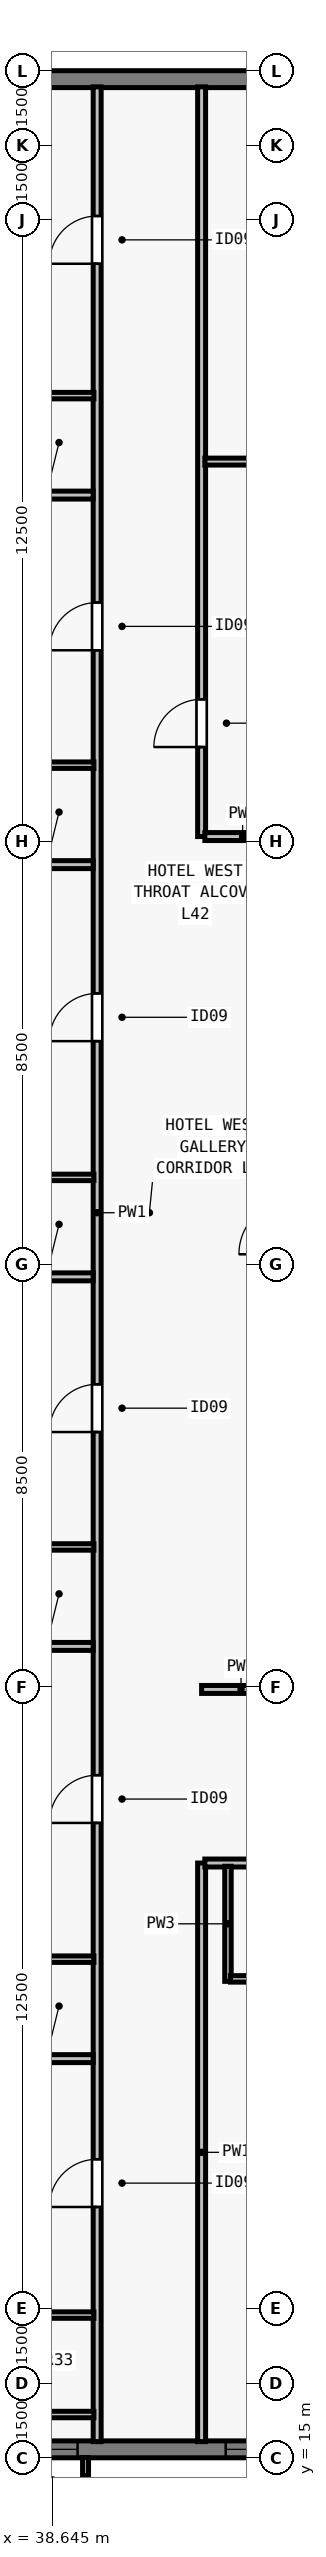
"""IFC4 building model, lengths in metres.
Left out: names, types, materials, properties, quantities, classifications, styles, units other than length and angle.
Written with IfcOpenShell. Run it as: python <this file> out.ifc"""

import sys

from ifc_helpers import new_model, si_unit, direction, frame, frame_2d, origin, place, context, subcontext, project, spatial, rectangle, extrude, element, fill, save


model = new_model("IFC4")
c1 = context("Model", 3, precision=1e-05, world=origin(), true_north=direction((0.0, 1.0)))
c2 = subcontext(c1, "Body", "Model", "MODEL_VIEW")
j1 = project(units=[si_unit("LENGTHUNIT", "METRE"), si_unit("PLANEANGLEUNIT", "RADIAN")], contexts=[c1])
p1 = place(None, origin())
s1 = spatial("IfcSite", under=j1, at=p1, CompositionType="ELEMENT")
p2 = place(p1, origin())
s2 = spatial("IfcBuilding", under=s1, at=p2, CompositionType="ELEMENT")
p3 = place(p2, frame((0.0, 0.0, 155.0)))
s3 = spatial("IfcBuildingStorey", under=s2, at=p3, CompositionType="ELEMENT", Elevation=155.0)
p4 = place(p3, frame((48.6, 15.17, 0.0), z_axis=(0.0, 0.0, 1.0), x_axis=(-1.0, 0.0, 0.0)))
e1 = element("IfcWall", 1, at=p4, inside=s3, PredefinedType="SOLIDWALL", context=c2, shape_type="SweptSolid", body=[
    extrude(rectangle(XDim=16.282, YDim=0.34, at=frame_2d((8.141, 0.0))), origin(), (0.0, 0.0, 1.0), 3.28),
])
p5 = place(p4, frame((2.439, 0.0, 0.8)))
e2 = element("IfcOpeningElement", 2, at=p5, cuts=e1, PredefinedType="OPENING", context=c2, shape_type="SweptSolid", body=[
    extrude(rectangle(XDim=1.35, YDim=1.66, at=frame_2d((0.675, 0.83))), frame((0.0, 0.18, 0.0), z_axis=(0.0, -1.0, 0.0), x_axis=(1.0, 0.0, 0.0)), (0.0, 0.0, 1.0), 0.36),
])
p6 = place(p4, frame((4.716, 0.0, 0.8)))
e3 = element("IfcOpeningElement", 3, at=p6, cuts=e1, PredefinedType="OPENING", context=c2, shape_type="SweptSolid", body=[
    extrude(rectangle(XDim=1.75, YDim=1.66, at=frame_2d((0.875, 0.83))), frame((0.0, 0.18, 0.0), z_axis=(0.0, -1.0, 0.0), x_axis=(1.0, 0.0, 0.0)), (0.0, 0.0, 1.0), 0.36),
])
p7 = place(p4, frame((9.443, 0.0, 0.8)))
e4 = element("IfcOpeningElement", 4, at=p7, cuts=e1, PredefinedType="OPENING", context=c2, shape_type="SweptSolid", body=[
    extrude(rectangle(XDim=1.35, YDim=1.66, at=frame_2d((0.675, 0.83))), frame((0.0, 0.18, 0.0), z_axis=(0.0, -1.0, 0.0), x_axis=(1.0, 0.0, 0.0)), (0.0, 0.0, 1.0), 0.36),
])
p8 = place(p3, frame((32.0, 62.83, 0.0), z_axis=(0.0, 0.0, 1.0), x_axis=(1.0, 0.0, 0.0)))
e5 = element("IfcWall", 5, at=p8, inside=s3, PredefinedType="SOLIDWALL", context=c2, shape_type="SweptSolid", body=[
    extrude(rectangle(XDim=39.682, YDim=0.34, at=frame_2d((19.841, 0.0))), origin(), (0.0, 0.0, 1.0), 3.28),
])
p9 = place(p8, frame((4.952, 0.0, 0.8)))
e6 = element("IfcOpeningElement", 6, at=p9, cuts=e5, PredefinedType="OPENING", context=c2, shape_type="SweptSolid", body=[
    extrude(rectangle(XDim=1.35, YDim=1.66, at=frame_2d((0.675, 0.83))), frame((0.0, 0.18, 0.0), z_axis=(0.0, -1.0, 0.0), x_axis=(1.0, 0.0, 0.0)), (0.0, 0.0, 1.0), 0.36),
])
p10 = place(p8, frame((12.059, 0.0, 0.8)))
e7 = element("IfcOpeningElement", 7, at=p10, cuts=e5, PredefinedType="OPENING", context=c2, shape_type="SweptSolid", body=[
    extrude(rectangle(XDim=1.35, YDim=1.66, at=frame_2d((0.675, 0.83))), frame((0.0, 0.18, 0.0), z_axis=(0.0, -1.0, 0.0), x_axis=(1.0, 0.0, 0.0)), (0.0, 0.0, 1.0), 0.36),
])
p11 = place(p8, frame((16.262, 0.0, 0.8)))
e8 = element("IfcOpeningElement", 8, at=p11, cuts=e5, PredefinedType="OPENING", context=c2, shape_type="SweptSolid", body=[
    extrude(rectangle(XDim=1.75, YDim=1.66, at=frame_2d((0.875, 0.83))), frame((0.0, 0.18, 0.0), z_axis=(0.0, -1.0, 0.0), x_axis=(1.0, 0.0, 0.0)), (0.0, 0.0, 1.0), 0.36),
])
p12 = place(p8, frame((18.316, 0.0, 0.8)))
e9 = element("IfcOpeningElement", 9, at=p12, cuts=e5, PredefinedType="OPENING", context=c2, shape_type="SweptSolid", body=[
    extrude(rectangle(XDim=1.35, YDim=1.66, at=frame_2d((0.675, 0.83))), frame((0.0, 0.18, 0.0), z_axis=(0.0, -1.0, 0.0), x_axis=(1.0, 0.0, 0.0)), (0.0, 0.0, 1.0), 0.36),
])
p13 = place(p8, frame((22.07, 0.0, 0.8)))
e10 = element("IfcOpeningElement", 10, at=p13, cuts=e5, PredefinedType="OPENING", context=c2, shape_type="SweptSolid", body=[
    extrude(rectangle(XDim=1.75, YDim=1.66, at=frame_2d((0.875, 0.83))), frame((0.0, 0.18, 0.0), z_axis=(0.0, -1.0, 0.0), x_axis=(1.0, 0.0, 0.0)), (0.0, 0.0, 1.0), 0.36),
])
p14 = place(p8, frame((26.273, 0.0, 0.8)))
e11 = element("IfcOpeningElement", 11, at=p14, cuts=e5, PredefinedType="OPENING", context=c2, shape_type="SweptSolid", body=[
    extrude(rectangle(XDim=1.35, YDim=1.66, at=frame_2d((0.675, 0.83))), frame((0.0, 0.18, 0.0), z_axis=(0.0, -1.0, 0.0), x_axis=(1.0, 0.0, 0.0)), (0.0, 0.0, 1.0), 0.36),
])
p15 = place(p8, frame((29.627, 0.0, 0.8)))
e12 = element("IfcOpeningElement", 12, at=p15, cuts=e5, PredefinedType="OPENING", context=c2, shape_type="SweptSolid", body=[
    extrude(rectangle(XDim=1.75, YDim=1.66, at=frame_2d((0.875, 0.83))), frame((0.0, 0.18, 0.0), z_axis=(0.0, -1.0, 0.0), x_axis=(1.0, 0.0, 0.0)), (0.0, 0.0, 1.0), 0.36),
])
p16 = place(p3, frame((39.55, 15.325, 0.0), z_axis=(0.0, 0.0, 1.0), x_axis=(0.0, 1.0, 0.0)))
e13 = element("IfcWall", 13, at=p16, inside=s3, PredefinedType="PARTITIONING", context=c2, shape_type="SweptSolid", body=[
    extrude(rectangle(XDim=47.35, YDim=0.16, at=frame_2d((23.675, 0.0))), origin(), (0.0, 0.0, 1.0), 2.555),
])
p17 = place(p16, frame((4.718, 0.0, 0.0)))
e14 = element("IfcOpeningElement", 14, at=p17, cuts=e13, PredefinedType="OPENING", context=c2, shape_type="SweptSolid", body=[
    extrude(rectangle(XDim=0.96, YDim=2.15, at=frame_2d((0.48, 1.075))), frame((0.0, 0.09, 0.0), z_axis=(0.0, -1.0, 0.0), x_axis=(1.0, 0.0, 0.0)), (0.0, 0.0, 1.0), 0.18),
])
p18 = place(p16, frame((12.441, 0.0, 0.0)))
e15 = element("IfcOpeningElement", 15, at=p18, cuts=e13, PredefinedType="OPENING", context=c2, shape_type="SweptSolid", body=[
    extrude(rectangle(XDim=0.96, YDim=2.15, at=frame_2d((0.48, 1.075))), frame((0.0, 0.09, 0.0), z_axis=(0.0, -1.0, 0.0), x_axis=(1.0, 0.0, 0.0)), (0.0, 0.0, 1.0), 0.18),
])
p19 = place(p16, frame((20.301, 0.0, 0.0)))
e16 = element("IfcOpeningElement", 16, at=p19, cuts=e13, PredefinedType="OPENING", context=c2, shape_type="SweptSolid", body=[
    extrude(rectangle(XDim=0.96, YDim=2.15, at=frame_2d((0.48, 1.075))), frame((0.0, 0.09, 0.0), z_axis=(0.0, -1.0, 0.0), x_axis=(1.0, 0.0, 0.0)), (0.0, 0.0, 1.0), 0.18),
])
p20 = place(p16, frame((28.161, 0.0, 0.0)))
e17 = element("IfcOpeningElement", 17, at=p20, cuts=e13, PredefinedType="OPENING", context=c2, shape_type="SweptSolid", body=[
    extrude(rectangle(XDim=0.96, YDim=2.15, at=frame_2d((0.48, 1.075))), frame((0.0, 0.09, 0.0), z_axis=(0.0, -1.0, 0.0), x_axis=(1.0, 0.0, 0.0)), (0.0, 0.0, 1.0), 0.18),
])
p21 = place(p16, frame((36.021, 0.0, 0.0)))
e18 = element("IfcOpeningElement", 18, at=p21, cuts=e13, PredefinedType="OPENING", context=c2, shape_type="SweptSolid", body=[
    extrude(rectangle(XDim=0.96, YDim=2.15, at=frame_2d((0.48, 1.075))), frame((0.0, 0.09, 0.0), z_axis=(0.0, -1.0, 0.0), x_axis=(1.0, 0.0, 0.0)), (0.0, 0.0, 1.0), 0.18),
])
p22 = place(p16, frame((43.793, 0.0, 0.0)))
e19 = element("IfcOpeningElement", 19, at=p22, cuts=e13, PredefinedType="OPENING", context=c2, shape_type="SweptSolid", body=[
    extrude(rectangle(XDim=0.96, YDim=2.15, at=frame_2d((0.48, 1.075))), frame((0.0, 0.09, 0.0), z_axis=(0.0, -1.0, 0.0), x_axis=(1.0, 0.0, 0.0)), (0.0, 0.0, 1.0), 0.18),
])
p23 = place(p3, frame((41.65, 15.325, 0.0), z_axis=(0.0, 0.0, 1.0), x_axis=(0.0, 1.0, 0.0)))
e20 = element("IfcWall", 20, at=p23, inside=s3, PredefinedType="PARTITIONING", context=c2, shape_type="SweptSolid", body=[
    extrude(rectangle(XDim=11.635, YDim=0.16, at=frame_2d((5.817, 0.0))), origin(), (0.0, 0.0, 1.0), 3.28),
])
p24 = place(p3, frame((41.65, 47.6, 0.0), z_axis=(0.0, 0.0, 1.0), x_axis=(0.0, 1.0, 0.0)))
e21 = element("IfcWall", 21, at=p24, inside=s3, PredefinedType="PARTITIONING", context=c2, shape_type="SweptSolid", body=[
    extrude(rectangle(XDim=15.075, YDim=0.16, at=frame_2d((7.538, 0.0))), origin(), (0.0, 0.0, 1.0), 2.555),
])
p25 = place(p24, frame((1.8, 0.0, 0.0)))
e22 = element("IfcOpeningElement", 22, at=p25, cuts=e21, PredefinedType="OPENING", context=c2, shape_type="SweptSolid", body=[
    extrude(rectangle(XDim=0.96, YDim=2.12, at=frame_2d((0.48, 1.06))), frame((0.0, 0.09, 0.0), z_axis=(0.0, -1.0, 0.0), x_axis=(1.0, 0.0, 0.0)), (0.0, 0.0, 1.0), 0.18),
])
p26 = place(p3, frame((41.65, 30.45, 0.0), z_axis=(0.0, 0.0, 1.0), x_axis=(1.0, 0.0, 0.0)))
e23 = element("IfcWall", 23, at=p26, inside=s3, PredefinedType="PARTITIONING", context=c2, shape_type="SweptSolid", body=[
    extrude(rectangle(XDim=1.585, YDim=0.16, at=frame_2d((0.792, 0.0))), origin(), (0.0, 0.0, 1.0), 3.28),
])
p27 = place(p3, frame((41.715, 47.6, 0.0), z_axis=(0.0, 0.0, 1.0), x_axis=(1.0, 0.0, 0.0)))
e24 = element("IfcWall", 24, at=p27, inside=s3, PredefinedType="PARTITIONING", context=c2, shape_type="SweptSolid", body=[
    extrude(rectangle(XDim=1.52, YDim=0.16, at=frame_2d((0.76, 0.0))), origin(), (0.0, 0.0, 1.0), 3.28),
])
p28 = place(p3, frame((41.715, 26.96, 0.0), z_axis=(0.0, 0.0, 1.0), x_axis=(1.0, 0.0, 0.0)))
e25 = element("IfcWall", 25, at=p28, inside=s3, PredefinedType="PARTITIONING", context=c2, shape_type="SweptSolid", body=[
    extrude(rectangle(XDim=22.07, YDim=0.16, at=frame_2d((11.035, 0.0))), origin(), (0.0, 0.0, 1.0), 3.28),
])
p29 = place(p28, frame((6.15, 0.0, 0.0)))
e26 = element("IfcOpeningElement", 26, at=p29, cuts=e25, PredefinedType="OPENING", context=c2, shape_type="SweptSolid", body=[
    extrude(rectangle(XDim=0.96, YDim=2.15, at=frame_2d((0.48, 1.075))), frame((0.0, 0.09, 0.0), z_axis=(0.0, -1.0, 0.0), x_axis=(1.0, 0.0, 0.0)), (0.0, 0.0, 1.0), 0.18),
])
p30 = place(p28, frame((16.945, 0.0, 0.0)))
e27 = element("IfcOpeningElement", 27, at=p30, cuts=e25, PredefinedType="OPENING", context=c2, shape_type="SweptSolid", body=[
    extrude(rectangle(XDim=0.96, YDim=2.15, at=frame_2d((0.48, 1.075))), frame((0.0, 0.09, 0.0), z_axis=(0.0, -1.0, 0.0), x_axis=(1.0, 0.0, 0.0)), (0.0, 0.0, 1.0), 0.18),
])
p31 = place(p3, frame((41.715, 55.14, 0.0), z_axis=(0.0, 0.0, 1.0), x_axis=(1.0, 0.0, 0.0)))
e28 = element("IfcWall", 28, at=p31, inside=s3, PredefinedType="PARTITIONING", context=c2, shape_type="SweptSolid", body=[
    extrude(rectangle(XDim=22.07, YDim=0.14, at=frame_2d((11.035, 0.0))), origin(), (0.0, 0.0, 1.0), 3.28),
])
p32 = place(p31, frame((3.435, 0.0, 0.0)))
e29 = element("IfcOpeningElement", 29, at=p32, cuts=e28, PredefinedType="OPENING", context=c2, shape_type="SweptSolid", body=[
    extrude(rectangle(XDim=0.92, YDim=2.12, at=frame_2d((0.46, 1.06))), frame((0.0, 0.08, 0.0), z_axis=(0.0, -1.0, 0.0), x_axis=(1.0, 0.0, 0.0)), (0.0, 0.0, 1.0), 0.16),
])
p33 = place(p31, frame((14.435, 0.0, 0.0)))
e30 = element("IfcOpeningElement", 30, at=p33, cuts=e28, PredefinedType="OPENING", context=c2, shape_type="SweptSolid", body=[
    extrude(rectangle(XDim=0.92, YDim=2.12, at=frame_2d((0.46, 1.06))), frame((0.0, 0.08, 0.0), z_axis=(0.0, -1.0, 0.0), x_axis=(1.0, 0.0, 0.0)), (0.0, 0.0, 1.0), 0.16),
])
p34 = place(p3, frame((42.18, 24.58, 0.0), z_axis=(0.0, 0.0, 1.0), x_axis=(0.0, 1.0, 0.0)))
e31 = element("IfcWall", 31, at=p34, inside=s3, PredefinedType="PLUMBINGWALL", context=c2, shape_type="SweptSolid", body=[
    extrude(rectangle(XDim=2.315, YDim=0.13, at=frame_2d((1.157, 0.0))), origin(), (0.0, 0.0, 1.0), 3.28),
])
p35 = place(p3, frame((42.23, 24.63, 0.0), z_axis=(0.0, 0.0, 1.0), x_axis=(1.0, 0.0, 0.0)))
e32 = element("IfcWall", 32, at=p35, inside=s3, PredefinedType="PLUMBINGWALL", context=c2, shape_type="SweptSolid", body=[
    extrude(rectangle(XDim=1.9, YDim=0.13, at=frame_2d((0.95, 0.0))), origin(), (0.0, 0.0, 1.0), 3.28),
])
p36 = place(p35, frame((0.54, 0.0, 0.0)))
e33 = element("IfcOpeningElement", 33, at=p36, cuts=e32, PredefinedType="OPENING", context=c2, shape_type="SweptSolid", body=[
    extrude(rectangle(XDim=0.82, YDim=2.1, at=frame_2d((0.41, 1.05))), frame((0.0, 0.075, 0.0), z_axis=(0.0, -1.0, 0.0), x_axis=(1.0, 0.0, 0.0)), (0.0, 0.0, 1.0), 0.15),
])
for number, where, z_axis, x_axis in (
    (34, (37.17, 15.87, 0.0), (0.0, 0.0, 1.0), (1.0, 0.0, 0.0)),
    (35, (37.17, 17.87, 0.0), (0.0, 0.0, 1.0), (1.0, 0.0, 0.0)),
):
    element("IfcWall", number, at=place(p3, frame(where, z_axis=z_axis, x_axis=x_axis)), inside=s3, PredefinedType="PLUMBINGWALL", context=c2, shape_type="SweptSolid", body=[
        extrude(rectangle(XDim=2.315, YDim=0.13, at=frame_2d((1.158, 0.0))), origin(), (0.0, 0.0, 1.0), 3.28),
    ])
p37 = place(p3, frame((28.325, 23.027, 0.0), z_axis=(0.0, 0.0, 1.0), x_axis=(1.0, 0.0, 0.0)))
e36 = element("IfcWall", 36, at=p37, inside=s3, PredefinedType="PARTITIONING", context=c2, shape_type="SweptSolid", body=[
    extrude(rectangle(XDim=11.145, YDim=0.16, at=frame_2d((5.573, 0.0))), origin(), (0.0, 0.0, 1.0), 2.896),
])
p38 = place(p3, frame((37.17, 25.027, 0.0), z_axis=(0.0, 0.0, 1.0), x_axis=(1.0, 0.0, 0.0)))
e37 = element("IfcWall", 37, at=p38, inside=s3, PredefinedType="PLUMBINGWALL", context=c2, shape_type="SweptSolid", body=[
    extrude(rectangle(XDim=2.315, YDim=0.13, at=frame_2d((1.158, 0.0))), origin(), (0.0, 0.0, 1.0), 3.28),
])
p39 = place(p3, frame((28.325, 31.315, 0.0), z_axis=(0.0, 0.0, 1.0), x_axis=(1.0, 0.0, 0.0)))
e38 = element("IfcWall", 38, at=p39, inside=s3, PredefinedType="PARTITIONING", context=c2, shape_type="SweptSolid", body=[
    extrude(rectangle(XDim=11.145, YDim=0.16, at=frame_2d((5.573, 0.0))), origin(), (0.0, 0.0, 1.0), 3.28),
])
p40 = place(p3, frame((37.17, 33.315, 0.0), z_axis=(0.0, 0.0, 1.0), x_axis=(1.0, 0.0, 0.0)))
e39 = element("IfcWall", 39, at=p40, inside=s3, PredefinedType="PLUMBINGWALL", context=c2, shape_type="SweptSolid", body=[
    extrude(rectangle(XDim=2.315, YDim=0.13, at=frame_2d((1.158, 0.0))), origin(), (0.0, 0.0, 1.0), 3.28),
])
p41 = place(p3, frame((28.325, 38.747, 0.0), z_axis=(0.0, 0.0, 1.0), x_axis=(1.0, 0.0, 0.0)))
e40 = element("IfcWall", 40, at=p41, inside=s3, PredefinedType="PARTITIONING", context=c2, shape_type="SweptSolid", body=[
    extrude(rectangle(XDim=11.145, YDim=0.16, at=frame_2d((5.573, 0.0))), origin(), (0.0, 0.0, 1.0), 2.896),
])
p42 = place(p3, frame((37.17, 40.747, 0.0), z_axis=(0.0, 0.0, 1.0), x_axis=(1.0, 0.0, 0.0)))
e41 = element("IfcWall", 41, at=p42, inside=s3, PredefinedType="PLUMBINGWALL", context=c2, shape_type="SweptSolid", body=[
    extrude(rectangle(XDim=2.315, YDim=0.13, at=frame_2d((1.158, 0.0))), origin(), (0.0, 0.0, 1.0), 3.28),
])
p43 = place(p3, frame((28.325, 47.035, 0.0), z_axis=(0.0, 0.0, 1.0), x_axis=(1.0, 0.0, 0.0)))
e42 = element("IfcWall", 42, at=p43, inside=s3, PredefinedType="PARTITIONING", context=c2, shape_type="SweptSolid", body=[
    extrude(rectangle(XDim=11.145, YDim=0.16, at=frame_2d((5.573, 0.0))), origin(), (0.0, 0.0, 1.0), 3.28),
])
p44 = place(p3, frame((37.17, 49.035, 0.0), z_axis=(0.0, 0.0, 1.0), x_axis=(1.0, 0.0, 0.0)))
e43 = element("IfcWall", 43, at=p44, inside=s3, PredefinedType="PLUMBINGWALL", context=c2, shape_type="SweptSolid", body=[
    extrude(rectangle(XDim=2.315, YDim=0.13, at=frame_2d((1.158, 0.0))), origin(), (0.0, 0.0, 1.0), 3.28),
])
p45 = place(p3, frame((28.325, 54.467, 0.0), z_axis=(0.0, 0.0, 1.0), x_axis=(1.0, 0.0, 0.0)))
e44 = element("IfcWall", 44, at=p45, inside=s3, PredefinedType="PARTITIONING", context=c2, shape_type="SweptSolid", body=[
    extrude(rectangle(XDim=11.145, YDim=0.16, at=frame_2d((5.573, 0.0))), origin(), (0.0, 0.0, 1.0), 2.896),
])
p46 = place(p3, frame((37.17, 56.467, 0.0), z_axis=(0.0, 0.0, 1.0), x_axis=(1.0, 0.0, 0.0)))
e45 = element("IfcWall", 45, at=p46, inside=s3, PredefinedType="PLUMBINGWALL", context=c2, shape_type="SweptSolid", body=[
    extrude(rectangle(XDim=2.315, YDim=0.13, at=frame_2d((1.158, 0.0))), origin(), (0.0, 0.0, 1.0), 3.28),
])
p47 = place(p6, origin())
e46 = element("IfcWindow", 46, at=p47, inside=s3, PartitioningType="SINGLE_PANEL", PredefinedType="WINDOW", context=c2, shape_type="SweptSolid", body=[
    extrude(rectangle(XDim=1.75, YDim=1.66, at=frame_2d((0.875, 0.83))), frame((0.0, -0.05, 0.0), z_axis=(0.0, -1.0, 0.0), x_axis=(1.0, 0.0, 0.0)), (0.0, 0.0, 1.0), 0.06),
])
fill(e3, e46)
p48 = place(p7, origin())
e47 = element("IfcWindow", 47, at=p48, inside=s3, PartitioningType="SINGLE_PANEL", PredefinedType="WINDOW", context=c2, shape_type="SweptSolid", body=[
    extrude(rectangle(XDim=1.35, YDim=1.66, at=frame_2d((0.675, 0.83))), frame((0.0, -0.05, 0.0), z_axis=(0.0, -1.0, 0.0), x_axis=(1.0, 0.0, 0.0)), (0.0, 0.0, 1.0), 0.06),
])
fill(e4, e47)
p49 = place(p25, origin())
e48 = element("IfcDoor", 48, at=p49, inside=s3, OperationType="SINGLE_SWING_LEFT", PredefinedType="DOOR", context=c2, shape_type="SweptSolid", body=[
    extrude(rectangle(XDim=0.96, YDim=2.12, at=frame_2d((0.48, 1.06))), frame((0.0, 0.025, 0.0), z_axis=(0.0, -1.0, 0.0), x_axis=(1.0, 0.0, 0.0)), (0.0, 0.0, 1.0), 0.05),
])
fill(e22, e48)
p50 = place(p17, origin())
e49 = element("IfcDoor", 49, at=p50, inside=s3, OperationType="SINGLE_SWING_LEFT", PredefinedType="DOOR", context=c2, shape_type="SweptSolid", body=[
    extrude(rectangle(XDim=0.96, YDim=2.15, at=frame_2d((0.48, 1.075))), frame((0.0, 0.025, 0.0), z_axis=(0.0, -1.0, 0.0), x_axis=(1.0, 0.0, 0.0)), (0.0, 0.0, 1.0), 0.05),
])
fill(e14, e49)
p51 = place(p18, origin())
e50 = element("IfcDoor", 50, at=p51, inside=s3, OperationType="SINGLE_SWING_LEFT", PredefinedType="DOOR", context=c2, shape_type="SweptSolid", body=[
    extrude(rectangle(XDim=0.96, YDim=2.15, at=frame_2d((0.48, 1.075))), frame((0.0, 0.025, 0.0), z_axis=(0.0, -1.0, 0.0), x_axis=(1.0, 0.0, 0.0)), (0.0, 0.0, 1.0), 0.05),
])
fill(e15, e50)
p52 = place(p19, origin())
e51 = element("IfcDoor", 51, at=p52, inside=s3, OperationType="SINGLE_SWING_LEFT", PredefinedType="DOOR", context=c2, shape_type="SweptSolid", body=[
    extrude(rectangle(XDim=0.96, YDim=2.15, at=frame_2d((0.48, 1.075))), frame((0.0, 0.025, 0.0), z_axis=(0.0, -1.0, 0.0), x_axis=(1.0, 0.0, 0.0)), (0.0, 0.0, 1.0), 0.05),
])
fill(e16, e51)
p53 = place(p20, origin())
e52 = element("IfcDoor", 52, at=p53, inside=s3, OperationType="SINGLE_SWING_LEFT", PredefinedType="DOOR", context=c2, shape_type="SweptSolid", body=[
    extrude(rectangle(XDim=0.96, YDim=2.15, at=frame_2d((0.48, 1.075))), frame((0.0, 0.025, 0.0), z_axis=(0.0, -1.0, 0.0), x_axis=(1.0, 0.0, 0.0)), (0.0, 0.0, 1.0), 0.05),
])
fill(e17, e52)
p54 = place(p21, origin())
e53 = element("IfcDoor", 53, at=p54, inside=s3, OperationType="SINGLE_SWING_LEFT", PredefinedType="DOOR", context=c2, shape_type="SweptSolid", body=[
    extrude(rectangle(XDim=0.96, YDim=2.15, at=frame_2d((0.48, 1.075))), frame((0.0, 0.025, 0.0), z_axis=(0.0, -1.0, 0.0), x_axis=(1.0, 0.0, 0.0)), (0.0, 0.0, 1.0), 0.05),
])
fill(e18, e53)
p55 = place(p22, origin())
e54 = element("IfcDoor", 54, at=p55, inside=s3, OperationType="SINGLE_SWING_LEFT", PredefinedType="DOOR", context=c2, shape_type="SweptSolid", body=[
    extrude(rectangle(XDim=0.96, YDim=2.15, at=frame_2d((0.48, 1.075))), frame((0.0, 0.025, 0.0), z_axis=(0.0, -1.0, 0.0), x_axis=(1.0, 0.0, 0.0)), (0.0, 0.0, 1.0), 0.05),
])
fill(e19, e54)
save(model, sys.argv[1])
